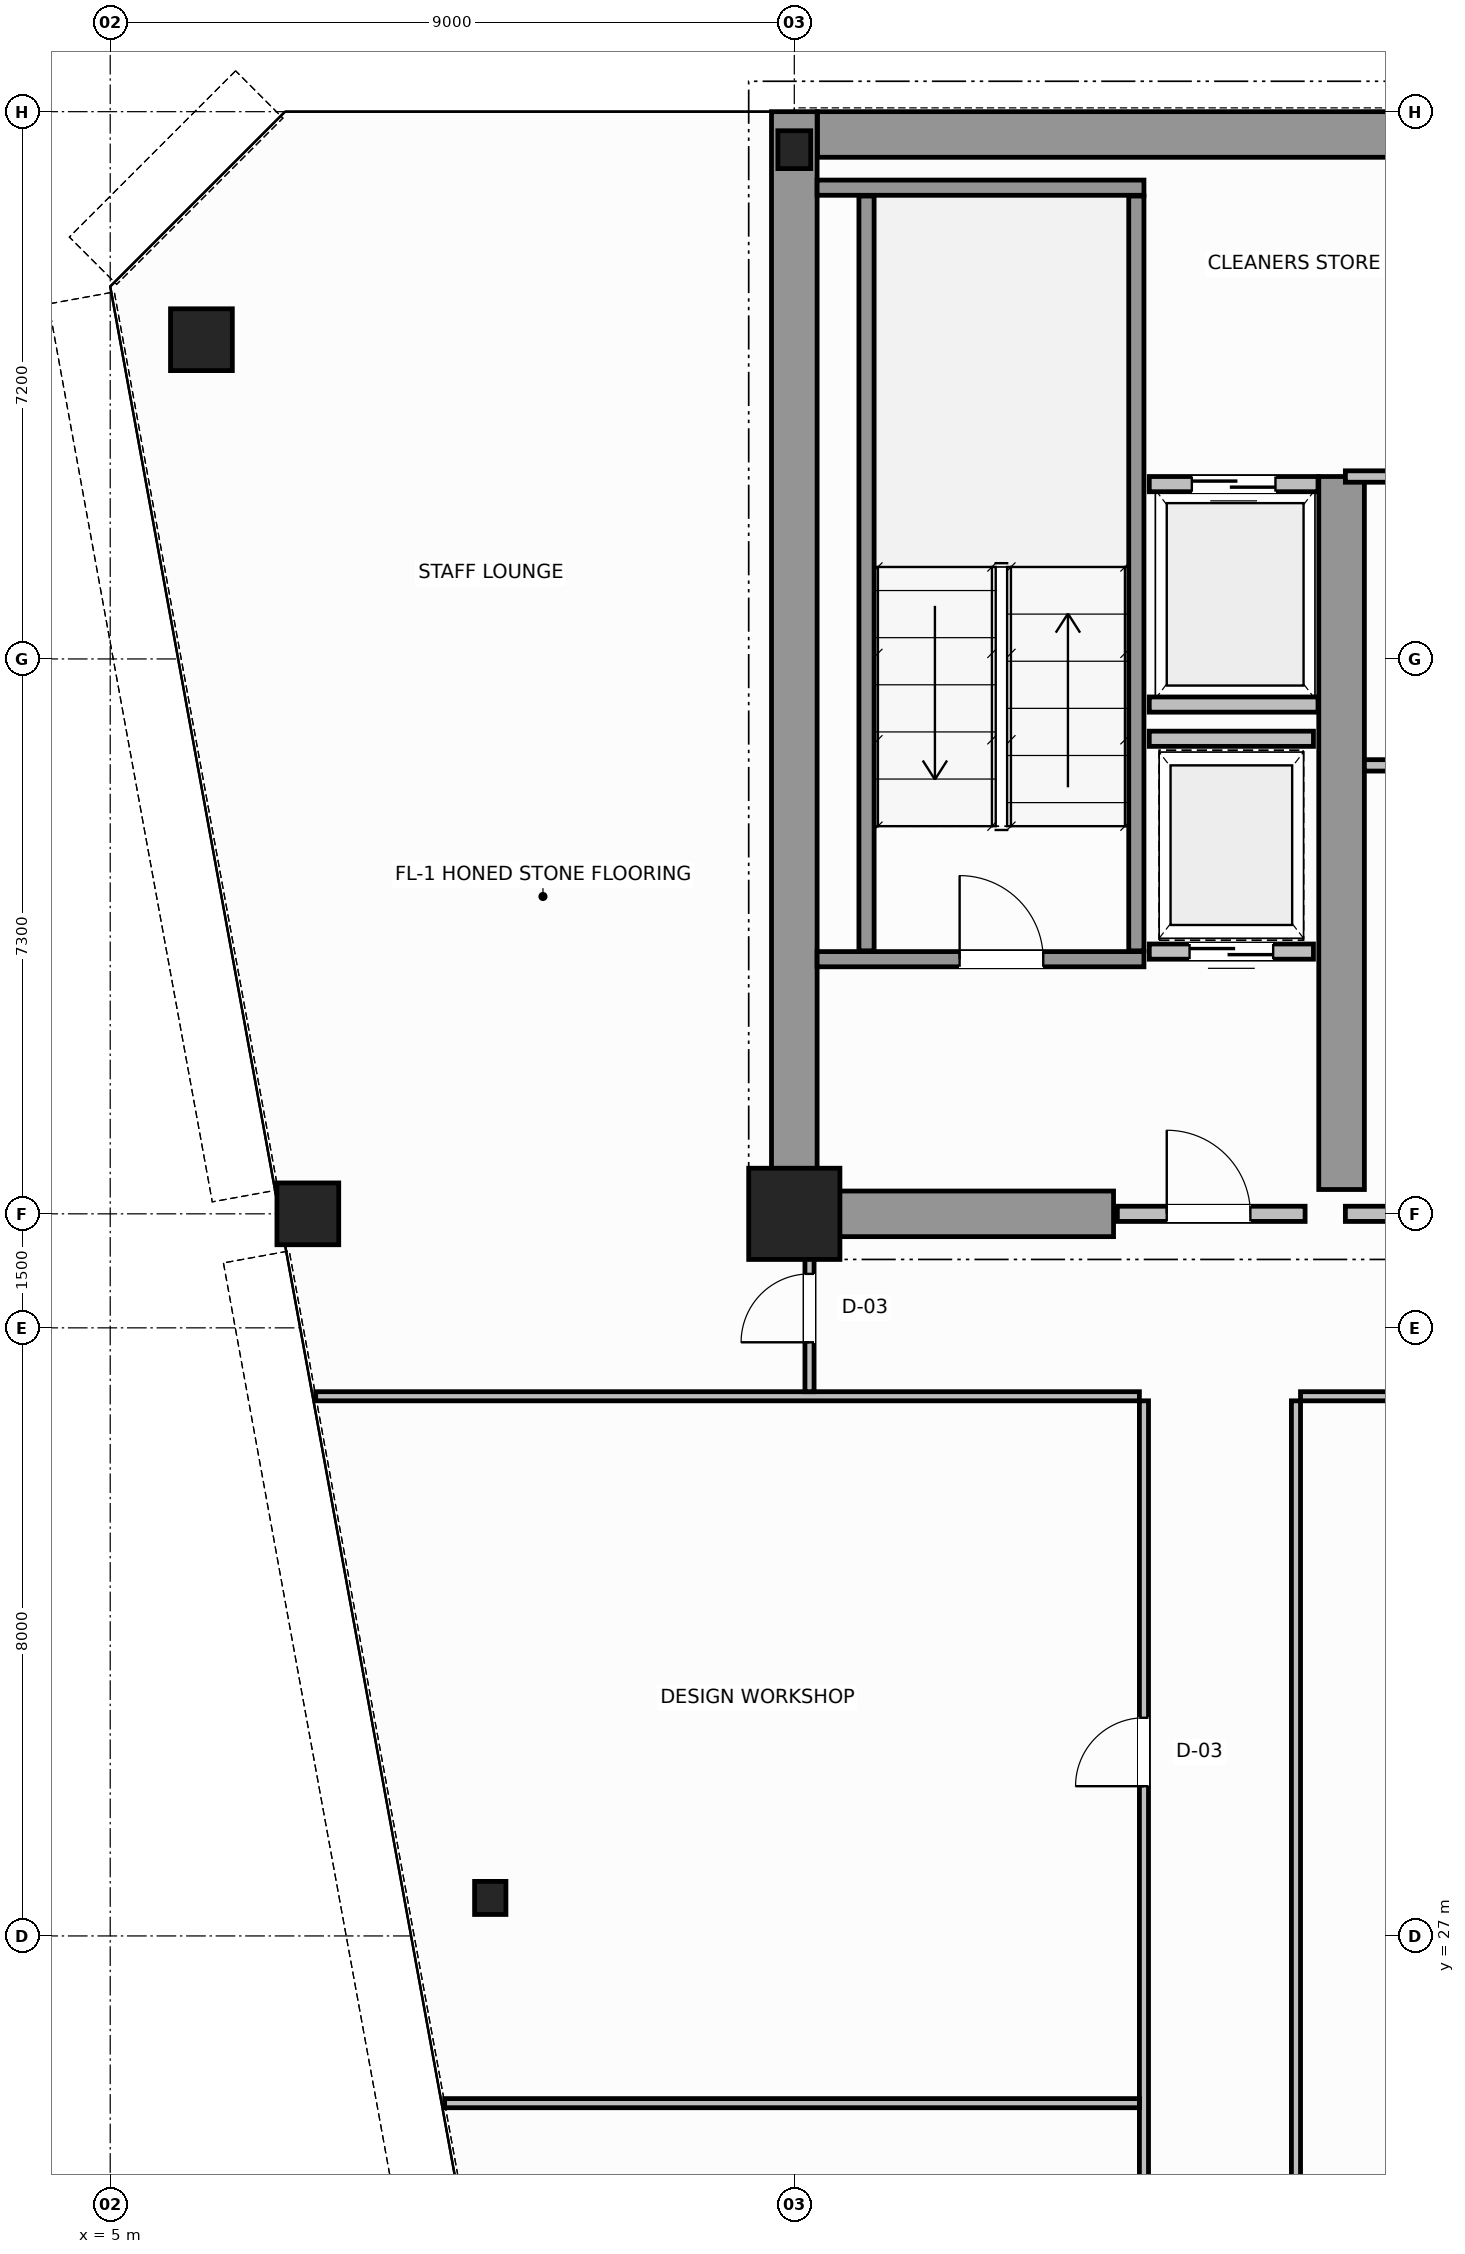
"""IFC4 building model, lengths in metres.
Left out: names, types, materials, properties, quantities, classifications, styles, units other than length and angle.
Written with IfcOpenShell. Run it as: python <this file> out.ifc"""

import sys

from ifc_helpers import new_model, si_unit, direction, frame, frame_2d, origin, origin_2d, place, context, subcontext, project, spatial, rectangle, hollow_circle, i_section, extrude, source, transform, mapped, element, fill, save


model = new_model("IFC4")
c1 = context("Model", 3, precision=1e-05, world=origin(), true_north=direction((0.0, 1.0)))
c2 = subcontext(c1, "Body", "Model", "MODEL_VIEW")
j1 = project(units=[si_unit("LENGTHUNIT", "METRE"), si_unit("PLANEANGLEUNIT", "RADIAN")], contexts=[c1])
p1 = place(None, origin())
s1 = spatial("IfcSite", under=j1, at=p1, CompositionType="ELEMENT")
p2 = place(p1, origin())
s2 = spatial("IfcBuilding", under=s1, at=p2, CompositionType="ELEMENT")
p3 = place(p2, frame((0.0, 0.0, 169.0)))
s3 = spatial("IfcBuildingStorey", under=s2, at=p3, CompositionType="ELEMENT", Elevation=169.0)
m1 = source(origin(), c2, "Body", "SweptSolid", [
    extrude(rectangle(XDim=1.2, YDim=1.2, at=origin_2d()), origin(), (0.0, 0.0, 1.0), 3.8),
])
p4 = place(p3, frame((14.0, 36.5, 0.0), z_axis=(0.0, 0.0, 1.0), x_axis=(1.0, 0.0, 0.0)))
e1 = element("IfcColumn", 1, at=p4, inside=s3, PredefinedType="COLUMN", context=c2, shape_type="MappedRepresentation", body=[
    mapped(m1, transform((0.0, 0.0, 0.0), scale=1.0)),
])
m2 = source(origin(), c2, "Body", "SweptSolid", [
    extrude(i_section(OverallWidth=0.432, OverallDepth=0.498, WebThickness=0.055, FlangeThickness=0.068, FilletRadius=0.015, at=origin_2d()), origin(), (0.0, 0.0, 1.0), 3.8),
])
p5 = place(p3, frame((14.0, 50.5, 0.0), z_axis=(0.0, 0.0, 1.0), x_axis=(1.0, 0.0, 0.0)))
e2 = element("IfcColumn", 2, at=p5, inside=s3, PredefinedType="COLUMN", context=c2, shape_type="MappedRepresentation", body=[
    mapped(m2, transform((0.0, 0.0, 0.0), scale=1.0)),
])
m3 = source(origin(), c2, "Body", "SweptSolid", [
    extrude(hollow_circle(Radius=0.406, WallThickness=0.04, at=origin_2d()), origin(), (0.0, 0.0, 1.0), 3.8),
])
for number, where, z_axis, x_axis in (
    (3, (6.2, 48.0, 0.0), (0.0, 0.0, 1.0), (1.0, 0.0, 0.0)),
    (4, (7.6, 36.5, 0.0), (0.0, 0.0, 1.0), (1.0, 0.0, 0.0)),
):
    element("IfcColumn", number, at=place(p3, frame(where, z_axis=z_axis, x_axis=x_axis)), inside=s3, PredefinedType="COLUMN", context=c2, shape_type="MappedRepresentation", body=[
        mapped(m3, transform((0.0, 0.0, 0.0), scale=1.0)),
    ])
m4 = source(origin(), c2, "Body", "SweptSolid", [
    extrude(i_section(OverallWidth=0.412, OverallDepth=0.435, WebThickness=0.036, FlangeThickness=0.05, FilletRadius=0.015, at=origin_2d()), origin(), (0.0, 0.0, 1.0), 3.8),
])
p6 = place(p3, frame((10.0, 27.5, 0.0), z_axis=(0.0, 0.0, 1.0), x_axis=(1.0, 0.0, 0.0)))
e5 = element("IfcColumn", 5, at=p6, inside=s3, PredefinedType="COLUMN", context=c2, shape_type="MappedRepresentation", body=[
    mapped(m4, transform((0.0, 0.0, 0.0), scale=1.0)),
])
p7 = place(p3, frame((14.304, 50.7, 0.0), z_axis=(0.0, 0.0, 1.0), x_axis=(1.0, 0.0, 0.0)))
e6 = element("IfcWall", 6, at=p7, inside=s3, PredefinedType="SHEAR", context=c2, shape_type="SweptSolid", body=[
    extrude(rectangle(XDim=19.694, YDim=0.6, at=frame_2d((9.847, 0.0))), origin(), (0.0, 0.0, 1.0), 3.8),
])
p8 = place(p3, frame((14.0, 36.5, 0.0), z_axis=(0.0, 0.0, 1.0), x_axis=(0.0, 1.0, 0.0)))
e7 = element("IfcWall", 7, at=p8, inside=s3, PredefinedType="SHEAR", context=c2, shape_type="SweptSolid", body=[
    extrude(rectangle(XDim=14.5, YDim=0.6, at=frame_2d((7.25, 0.0))), origin(), (0.0, 0.0, 1.0), 3.8),
])
p9 = place(p3, frame((14.32, 36.5, 0.0), z_axis=(0.0, 0.0, 1.0), x_axis=(1.0, 0.0, 0.0)))
e8 = element("IfcWall", 8, at=p9, inside=s3, PredefinedType="SHEAR", context=c2, shape_type="SweptSolid", body=[
    extrude(rectangle(XDim=3.88, YDim=0.6, at=frame_2d((1.94, 0.0))), origin(), (0.0, 0.0, 1.0), 2.58),
])
p10 = place(p3, frame((21.2, 36.82, 0.0), z_axis=(0.0, 0.0, 1.0), x_axis=(0.0, 1.0, 0.0)))
e9 = element("IfcWall", 9, at=p10, inside=s3, PredefinedType="SHEAR", context=c2, shape_type="SweptSolid", body=[
    extrude(rectangle(XDim=9.38, YDim=0.6, at=frame_2d((4.69, 0.0))), origin(), (0.0, 0.0, 1.0), 3.8),
])
p11 = place(p3, frame((14.3, 39.85, 0.0), z_axis=(0.0, 0.0, 1.0), x_axis=(1.0, 0.0, 0.0)))
e10 = element("IfcWall", 10, at=p11, inside=s3, PredefinedType="SOLIDWALL", context=c2, shape_type="SweptSolid", body=[
    extrude(rectangle(XDim=4.3, YDim=0.2, at=frame_2d((2.15, 0.0))), origin(), (0.0, 0.0, 1.0), 3.8),
])
p12 = place(p11, frame((1.875, 0.0, 0.0)))
e11 = element("IfcOpeningElement", 11, at=p12, cuts=e10, PredefinedType="OPENING", context=c2, shape_type="SweptSolid", body=[
    extrude(rectangle(XDim=1.1, YDim=2.15, at=frame_2d((0.55, 1.075))), frame((0.0, 0.11, 0.0), z_axis=(0.0, -1.0, 0.0), x_axis=(1.0, 0.0, 0.0)), (0.0, 0.0, 1.0), 0.22),
])
p13 = place(p3, frame((14.3, 50.0, 0.0), z_axis=(0.0, 0.0, 1.0), x_axis=(1.0, 0.0, 0.0)))
e12 = element("IfcWall", 12, at=p13, inside=s3, PredefinedType="SOLIDWALL", context=c2, shape_type="SweptSolid", body=[
    extrude(rectangle(XDim=4.3, YDim=0.2, at=frame_2d((2.15, 0.0))), origin(), (0.0, 0.0, 1.0), 3.8),
])
for number, where, z_axis, x_axis in (
    (13, (14.95, 39.96, 0.0), (0.0, 0.0, 1.0), (0.0, 1.0, 0.0)),
    (14, (18.5, 39.96, 0.0), (0.0, 0.0, 1.0), (0.0, 1.0, 0.0)),
):
    element("IfcWall", number, at=place(p3, frame(where, z_axis=z_axis, x_axis=x_axis)), inside=s3, PredefinedType="SOLIDWALL", context=c2, shape_type="SweptSolid", body=[
        extrude(rectangle(XDim=9.93, YDim=0.2, at=frame_2d((4.965, 0.0))), origin(), (0.0, 0.0, 1.0), 3.8),
    ])
p14 = place(p3, frame((18.25, 36.5, 0.0), z_axis=(0.0, 0.0, 1.0), x_axis=(1.0, 0.0, 0.0)))
e15 = element("IfcWall", 15, at=p14, inside=s3, PredefinedType="SOLIDWALL", context=c2, shape_type="SweptSolid", body=[
    extrude(rectangle(XDim=2.47, YDim=0.2, at=frame_2d((1.235, 0.0))), origin(), (0.0, 0.0, 1.0), 2.57),
])
p15 = place(p14, frame((0.65, 0.0, 0.0)))
e16 = element("IfcOpeningElement", 16, at=p15, cuts=e15, PredefinedType="OPENING", context=c2, shape_type="SweptSolid", body=[
    extrude(rectangle(XDim=1.1, YDim=2.15, at=frame_2d((0.55, 1.075))), frame((0.0, 0.11, 0.0), z_axis=(0.0, -1.0, 0.0), x_axis=(1.0, 0.0, 0.0)), (0.0, 0.0, 1.0), 0.22),
])
p16 = place(p3, frame((18.67, 46.1, 0.0), z_axis=(0.0, 0.0, 1.0), x_axis=(1.0, 0.0, 0.0)))
e17 = element("IfcWall", 17, at=p16, inside=s3, PredefinedType="SOLIDWALL", context=c2, shape_type="SweptSolid", body=[
    extrude(rectangle(XDim=2.22, YDim=0.2, at=frame_2d((1.11, 0.0))), origin(), (0.0, 0.0, 1.0), 3.58),
])
p17 = place(p16, frame((0.56, 0.0, 0.0)))
e18 = element("IfcOpeningElement", 18, at=p17, cuts=e17, PredefinedType="OPENING", context=c2, shape_type="SweptSolid", body=[
    extrude(rectangle(XDim=1.1, YDim=2.15, at=frame_2d((0.55, 1.075))), frame((0.0, 0.11, 0.0), z_axis=(0.0, -1.0, 0.0), x_axis=(1.0, 0.0, 0.0)), (0.0, 0.0, 1.0), 0.22),
])
p18 = place(p3, frame((18.67, 43.2, 0.0), z_axis=(0.0, 0.0, 1.0), x_axis=(1.0, 0.0, 0.0)))
e19 = element("IfcWall", 19, at=p18, inside=s3, PredefinedType="SOLIDWALL", context=c2, shape_type="SweptSolid", body=[
    extrude(rectangle(XDim=2.22, YDim=0.2, at=frame_2d((1.11, 0.0))), origin(), (0.0, 0.0, 1.0), 3.58),
])
p19 = place(p3, frame((18.67, 39.95, 0.0), z_axis=(0.0, 0.0, 1.0), x_axis=(1.0, 0.0, 0.0)))
e20 = element("IfcWall", 20, at=p19, inside=s3, PredefinedType="SOLIDWALL", context=c2, shape_type="SweptSolid", body=[
    extrude(rectangle(XDim=2.16, YDim=0.2, at=frame_2d((1.08, 0.0))), origin(), (0.0, 0.0, 1.0), 3.58),
])
p20 = place(p19, frame((0.53, 0.0, 0.0)))
e21 = element("IfcOpeningElement", 21, at=p20, cuts=e20, PredefinedType="OPENING", context=c2, shape_type="SweptSolid", body=[
    extrude(rectangle(XDim=1.1, YDim=2.15, at=frame_2d((0.55, 1.075))), frame((0.0, 0.11, 0.0), z_axis=(0.0, -1.0, 0.0), x_axis=(1.0, 0.0, 0.0)), (0.0, 0.0, 1.0), 0.22),
])
p21 = place(p3, frame((18.67, 42.75, 0.0), z_axis=(0.0, 0.0, 1.0), x_axis=(1.0, 0.0, 0.0)))
e22 = element("IfcWall", 22, at=p21, inside=s3, PredefinedType="SOLIDWALL", context=c2, shape_type="SweptSolid", body=[
    extrude(rectangle(XDim=2.16, YDim=0.2, at=frame_2d((1.08, 0.0))), origin(), (0.0, 0.0, 1.0), 3.58),
])
p22 = place(p3, frame((21.25, 36.5, 0.0), z_axis=(0.0, 0.0, 1.0), x_axis=(1.0, 0.0, 0.0)))
e23 = element("IfcWall", 23, at=p22, inside=s3, PredefinedType="SOLIDWALL", context=c2, shape_type="SweptSolid", body=[
    extrude(rectangle(XDim=6.27, YDim=0.2, at=frame_2d((3.135, 0.0))), origin(), (0.0, 0.0, 1.0), 2.57),
])
p23 = place(p22, frame((2.6, 0.0, 0.0)))
e24 = element("IfcOpeningElement", 24, at=p23, cuts=e23, PredefinedType="OPENING", context=c2, shape_type="SweptSolid", body=[
    extrude(rectangle(XDim=1.1, YDim=2.15, at=frame_2d((0.55, 1.075))), frame((0.0, 0.11, 0.0), z_axis=(0.0, -1.0, 0.0), x_axis=(1.0, 0.0, 0.0)), (0.0, 0.0, 1.0), 0.22),
])
p24 = place(p3, frame((21.25, 46.2, 0.0), z_axis=(0.0, 0.0, 1.0), x_axis=(1.0, 0.0, 0.0)))
e25 = element("IfcWall", 25, at=p24, inside=s3, PredefinedType="PARTITIONING", context=c2, shape_type="SweptSolid", body=[
    extrude(rectangle(XDim=8.5, YDim=0.15, at=frame_2d((4.25, 0.0))), origin(), (0.0, 0.0, 1.0), 3.58),
])
p25 = place(p3, frame((21.5, 42.4, 0.0), z_axis=(0.0, 0.0, 1.0), x_axis=(1.0, 0.0, 0.0)))
e26 = element("IfcWall", 26, at=p25, inside=s3, PredefinedType="PARTITIONING", context=c2, shape_type="SweptSolid", body=[
    extrude(rectangle(XDim=8.0, YDim=0.15, at=frame_2d((4.0, 0.0))), origin(), (0.0, 0.0, 1.0), 3.58),
])
p26 = place(p25, frame((3.4, 0.0, 0.0)))
e27 = element("IfcOpeningElement", 27, at=p26, cuts=e26, PredefinedType="OPENING", context=c2, shape_type="SweptSolid", body=[
    extrude(rectangle(XDim=0.9, YDim=2.1, at=frame_2d((0.45, 1.05))), frame((0.0, 0.085, 0.0), z_axis=(0.0, -1.0, 0.0), x_axis=(1.0, 0.0, 0.0)), (0.0, 0.0, 1.0), 0.17),
])
p27 = place(p3, frame((20.66, 34.1, 0.0), z_axis=(0.0, 0.0, 1.0), x_axis=(1.0, 0.0, 0.0)))
e28 = element("IfcWall", 28, at=p27, inside=s3, PredefinedType="PARTITIONING", context=c2, shape_type="SweptSolid", body=[
    extrude(rectangle(XDim=26.68, YDim=0.12, at=frame_2d((13.34, 0.0))), origin(), (0.0, 0.0, 1.0), 3.58),
])
p28 = place(p27, frame((3.39, 0.0, 0.0)))
e29 = element("IfcOpeningElement", 29, at=p28, cuts=e28, PredefinedType="OPENING", context=c2, shape_type="SweptSolid", body=[
    extrude(rectangle(XDim=0.9, YDim=2.15, at=frame_2d((0.45, 1.075))), frame((0.0, 0.07, 0.0), z_axis=(0.0, -1.0, 0.0), x_axis=(1.0, 0.0, 0.0)), (0.0, 0.0, 1.0), 0.14),
])
p29 = place(p27, frame((12.89, 0.0, 0.0)))
e30 = element("IfcOpeningElement", 30, at=p29, cuts=e28, PredefinedType="OPENING", context=c2, shape_type="SweptSolid", body=[
    extrude(rectangle(XDim=0.9, YDim=2.15, at=frame_2d((0.45, 1.075))), frame((0.0, 0.07, 0.0), z_axis=(0.0, -1.0, 0.0), x_axis=(1.0, 0.0, 0.0)), (0.0, 0.0, 1.0), 0.14),
])
p30 = place(p27, frame((22.39, 0.0, 0.0)))
e31 = element("IfcOpeningElement", 31, at=p30, cuts=e28, PredefinedType="OPENING", context=c2, shape_type="SweptSolid", body=[
    extrude(rectangle(XDim=0.9, YDim=2.15, at=frame_2d((0.45, 1.075))), frame((0.0, 0.07, 0.0), z_axis=(0.0, -1.0, 0.0), x_axis=(1.0, 0.0, 0.0)), (0.0, 0.0, 1.0), 0.14),
])
p31 = place(p3, frame((7.703, 34.1, 0.0), z_axis=(0.0, 0.0, 1.0), x_axis=(1.0, 0.0, 0.0)))
e32 = element("IfcWall", 32, at=p31, inside=s3, PredefinedType="PARTITIONING", context=c2, shape_type="SweptSolid", body=[
    extrude(rectangle(XDim=10.837, YDim=0.12, at=frame_2d((5.418, 0.0))), origin(), (0.0, 0.0, 1.0), 3.58),
])
p32 = place(p3, frame((14.2, 34.16, 0.0), z_axis=(0.0, 0.0, 1.0), x_axis=(0.0, 1.0, 0.0)))
e33 = element("IfcWall", 33, at=p32, inside=s3, PredefinedType="PARTITIONING", context=c2, shape_type="SweptSolid", body=[
    extrude(rectangle(XDim=2.28, YDim=0.12, at=frame_2d((1.14, 0.0))), origin(), (0.0, 0.0, 1.0), 3.58),
])
p33 = place(p32, frame((0.65, 0.0, 0.0)))
e34 = element("IfcOpeningElement", 34, at=p33, cuts=e33, PredefinedType="OPENING", context=c2, shape_type="SweptSolid", body=[
    extrude(rectangle(XDim=0.9, YDim=2.15, at=frame_2d((0.45, 1.075))), frame((0.0, 0.07, 0.0), z_axis=(0.0, -1.0, 0.0), x_axis=(1.0, 0.0, 0.0)), (0.0, 0.0, 1.0), 0.14),
])
p34 = place(p3, frame((18.6, 17.2, 0.0), z_axis=(0.0, 0.0, 1.0), x_axis=(0.0, 1.0, 0.0)))
e35 = element("IfcWall", 35, at=p34, inside=s3, PredefinedType="PARTITIONING", context=c2, shape_type="SweptSolid", body=[
    extrude(rectangle(XDim=16.84, YDim=0.12, at=frame_2d((8.42, 0.0))), origin(), (0.0, 0.0, 1.0), 3.58),
])
p35 = place(p34, frame((3.35, 0.0, 0.0)))
e36 = element("IfcOpeningElement", 36, at=p35, cuts=e35, PredefinedType="OPENING", context=c2, shape_type="SweptSolid", body=[
    extrude(rectangle(XDim=0.9, YDim=2.15, at=frame_2d((0.45, 1.075))), frame((0.0, 0.07, 0.0), z_axis=(0.0, -1.0, 0.0), x_axis=(1.0, 0.0, 0.0)), (0.0, 0.0, 1.0), 0.14),
])
p36 = place(p34, frame((11.77, 0.0, 0.0)))
e37 = element("IfcOpeningElement", 37, at=p36, cuts=e35, PredefinedType="OPENING", context=c2, shape_type="SweptSolid", body=[
    extrude(rectangle(XDim=0.9, YDim=2.15, at=frame_2d((0.45, 1.075))), frame((0.0, 0.07, 0.0), z_axis=(0.0, -1.0, 0.0), x_axis=(1.0, 0.0, 0.0)), (0.0, 0.0, 1.0), 0.14),
])
p37 = place(p3, frame((20.6, 17.2, 0.0), z_axis=(0.0, 0.0, 1.0), x_axis=(0.0, 1.0, 0.0)))
e38 = element("IfcWall", 38, at=p37, inside=s3, PredefinedType="PARTITIONING", context=c2, shape_type="SweptSolid", body=[
    extrude(rectangle(XDim=16.84, YDim=0.12, at=frame_2d((8.42, 0.0))), origin(), (0.0, 0.0, 1.0), 3.58),
])
p38 = place(p3, frame((9.4, 24.8, 0.0), z_axis=(0.0, 0.0, 1.0), x_axis=(1.0, 0.0, 0.0)))
e39 = element("IfcWall", 39, at=p38, inside=s3, PredefinedType="PARTITIONING", context=c2, shape_type="SweptSolid", body=[
    extrude(rectangle(XDim=9.14, YDim=0.12, at=frame_2d((4.57, 0.0))), origin(), (0.0, 0.0, 1.0), 3.58),
])
m5 = source(origin(), c2, "Body", "SweptSolid", [
    extrude(rectangle(XDim=1.1, YDim=2.15, at=frame_2d((0.55, 1.075))), frame((0.0, 0.025, 0.0), z_axis=(0.0, -1.0, 0.0), x_axis=(1.0, 0.0, 0.0)), (0.0, 0.0, 1.0), 0.05),
])
p39 = place(p12, origin())
e40 = element("IfcDoor", 40, at=p39, inside=s3, OperationType="SINGLE_SWING_LEFT", PredefinedType="DOOR", context=c2, shape_type="MappedRepresentation", body=[
    mapped(m5, transform((0.0, 0.0, 0.0), scale=1.0)),
])
fill(e11, e40)
p40 = place(p15, origin())
e41 = element("IfcDoor", 41, at=p40, inside=s3, OperationType="SINGLE_SWING_RIGHT", PredefinedType="DOOR", context=c2, shape_type="MappedRepresentation", body=[
    mapped(m5, transform((0.0, 0.0, 0.0), scale=1.0)),
])
fill(e16, e41)
p41 = place(p17, origin())
e42 = element("IfcDoor", 42, at=p41, inside=s3, OperationType="DOUBLE_DOOR_SLIDING", PredefinedType="DOOR", context=c2, shape_type="MappedRepresentation", body=[
    mapped(m5, transform((0.0, 0.0, 0.0), scale=1.0)),
])
fill(e18, e42)
p42 = place(p20, origin())
e43 = element("IfcDoor", 43, at=p42, inside=s3, OperationType="DOUBLE_DOOR_SLIDING", PredefinedType="DOOR", context=c2, shape_type="MappedRepresentation", body=[
    mapped(m5, transform((0.0, 0.0, 0.0), scale=1.0)),
])
fill(e21, e43)
m6 = source(origin(), c2, "Body", "SweptSolid", [
    extrude(rectangle(XDim=0.9, YDim=2.15, at=frame_2d((0.45, 1.075))), frame((0.0, 0.025, 0.0), z_axis=(0.0, -1.0, 0.0), x_axis=(1.0, 0.0, 0.0)), (0.0, 0.0, 1.0), 0.05),
])
p43 = place(p33, origin())
e44 = element("IfcDoor", 44, at=p43, inside=s3, OperationType="SINGLE_SWING_LEFT", PredefinedType="DOOR", context=c2, shape_type="MappedRepresentation", body=[
    mapped(m6, transform((0.0, 0.0, 0.0), scale=1.0)),
])
fill(e34, e44)
p44 = place(p36, origin())
e45 = element("IfcDoor", 45, at=p44, inside=s3, OperationType="SINGLE_SWING_RIGHT", PredefinedType="DOOR", context=c2, shape_type="MappedRepresentation", body=[
    mapped(m6, transform((0.0, 0.0, 0.0), scale=1.0)),
])
fill(e37, e45)
save(model, sys.argv[1])
